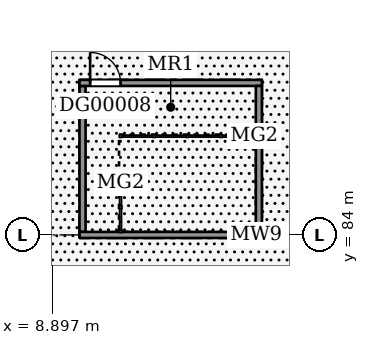
"""IFC4 building model, lengths in metres.
Left out: names, types, materials, properties, quantities, classifications, styles, units other than length and angle.
Written with IfcOpenShell. Run it as: python <this file> out.ifc"""

import sys

from ifc_helpers import new_model, si_unit, direction, frame, frame_2d, origin, place, context, subcontext, project, spatial, rectangle, extrude, element, fill, save


model = new_model("IFC4")
c1 = context("Model", 3, precision=1e-05, world=origin(), true_north=direction((0.0, 1.0)))
c2 = subcontext(c1, "Body", "Model", "MODEL_VIEW")
j1 = project(units=[si_unit("LENGTHUNIT", "METRE"), si_unit("PLANEANGLEUNIT", "RADIAN")], contexts=[c1])
p1 = place(None, origin())
s1 = spatial("IfcSite", under=j1, at=p1, CompositionType="ELEMENT")
p2 = place(p1, origin())
s2 = spatial("IfcBuilding", under=s1, at=p2, CompositionType="ELEMENT")
p3 = place(p2, origin())
s3 = spatial("IfcBuildingStorey", under=s2, at=p3, CompositionType="ELEMENT", Elevation=0.0)
p4 = place(p3, frame((9.9, 84.1, 0.0), z_axis=(0.0, 0.0, 1.0), x_axis=(0.0, 1.0, 0.0)))
e1 = element("IfcWall", 1, at=p4, inside=s3, PredefinedType="SOLIDWALL", context=c2, shape_type="SweptSolid", body=[
    extrude(rectangle(XDim=4.8, YDim=0.2, at=frame_2d((2.4, 0.0))), origin(), (0.0, 0.0, 1.0), 3.6),
])
p5 = place(p3, frame((9.8, 84.0, 0.0), z_axis=(0.0, 0.0, 1.0), x_axis=(1.0, 0.0, 0.0)))
e2 = element("IfcWall", 2, at=p5, inside=s3, PredefinedType="SOLIDWALL", context=c2, shape_type="SweptSolid", body=[
    extrude(rectangle(XDim=6.0, YDim=0.2, at=frame_2d((3.0, 0.0))), origin(), (0.0, 0.0, 1.0), 3.6),
])
p6 = place(p3, frame((9.8, 89.0, 0.0), z_axis=(0.0, 0.0, 1.0), x_axis=(1.0, 0.0, 0.0)))
e3 = element("IfcWall", 3, at=p6, inside=s3, PredefinedType="SOLIDWALL", context=c2, shape_type="SweptSolid", body=[
    extrude(rectangle(XDim=6.0, YDim=0.2, at=frame_2d((3.0, 0.0))), origin(), (0.0, 0.0, 1.0), 3.6),
])
p7 = place(p6, frame((0.35, 0.0, 0.0)))
e4 = element("IfcOpeningElement", 4, at=p7, cuts=e3, PredefinedType="OPENING", context=c2, shape_type="SweptSolid", body=[
    extrude(rectangle(XDim=1.0, YDim=2.1, at=frame_2d((0.5, 1.05))), frame((0.0, 0.11, 0.0), z_axis=(0.0, -1.0, 0.0), x_axis=(1.0, 0.0, 0.0)), (0.0, 0.0, 1.0), 0.22),
])
p8 = place(p3, frame((15.7, 84.1, 0.0), z_axis=(0.0, 0.0, 1.0), x_axis=(0.0, 1.0, 0.0)))
e5 = element("IfcWall", 5, at=p8, inside=s3, PredefinedType="SOLIDWALL", context=c2, shape_type="SweptSolid", body=[
    extrude(rectangle(XDim=4.8, YDim=0.2, at=frame_2d((2.4, 0.0))), origin(), (0.0, 0.0, 1.0), 3.6),
])
p9 = place(p7, origin())
e6 = element("IfcDoor", 6, at=p9, inside=s3, OperationType="SINGLE_SWING_LEFT", PredefinedType="DOOR", context=c2, shape_type="SweptSolid", body=[
    extrude(rectangle(XDim=1.0, YDim=2.1, at=frame_2d((0.5, 1.05))), frame((0.0, 0.025, 0.0), z_axis=(0.0, -1.0, 0.0), x_axis=(1.0, 0.0, 0.0)), (0.0, 0.0, 1.0), 0.05),
])
fill(e4, e6)
save(model, sys.argv[1])
